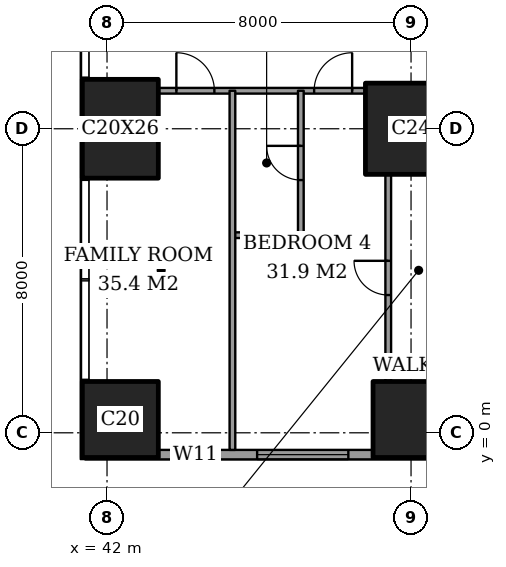
"""IFC4 building model, lengths in metres.
Left out: names, types, materials, properties, quantities, classifications, styles, units other than length and angle.
Written with IfcOpenShell. Run it as: python <this file> out.ifc"""

import sys

from ifc_helpers import new_model, si_unit, direction, frame, frame_2d, origin, origin_2d, place, context, subcontext, project, spatial, rectangle, extrude, element, fill, save


model = new_model("IFC4")
c1 = context("Model", 3, precision=1e-05, world=origin(), true_north=direction((0.0, 1.0)))
c2 = subcontext(c1, "Body", "Model", "MODEL_VIEW")
j1 = project(units=[si_unit("LENGTHUNIT", "METRE"), si_unit("PLANEANGLEUNIT", "RADIAN")], contexts=[c1])
p1 = place(None, origin())
s1 = spatial("IfcSite", under=j1, at=p1, CompositionType="ELEMENT")
p2 = place(p1, origin())
s2 = spatial("IfcBuilding", under=s1, at=p2, CompositionType="ELEMENT")
p3 = place(p2, frame((0.0, 0.0, 128.6)))
s3 = spatial("IfcBuildingStorey", under=s2, at=p3, CompositionType="ELEMENT", Elevation=128.6)
p4 = place(p3, frame((42.35, 0.35, 0.0), z_axis=(0.0, 0.0, 1.0), x_axis=(1.0, 0.0, 0.0)))
e1 = element("IfcColumn", 1, at=p4, inside=s3, PredefinedType="COLUMN", context=c2, shape_type="SweptSolid", body=[
    extrude(rectangle(XDim=2.0, YDim=2.0, at=origin_2d()), origin(), (0.0, 0.0, 1.0), 3.6),
])
p5 = place(p3, frame((42.35, 8.0, 0.0), z_axis=(0.0, 0.0, 1.0), x_axis=(1.0, 0.0, 0.0)))
e2 = element("IfcColumn", 2, at=p5, inside=s3, PredefinedType="COLUMN", context=c2, shape_type="SweptSolid", body=[
    extrude(rectangle(XDim=2.0, YDim=2.6, at=origin_2d()), origin(), (0.0, 0.0, 1.0), 3.6),
])
p6 = place(p3, frame((50.0, 0.35, 0.0), z_axis=(0.0, 0.0, 1.0), x_axis=(1.0, 0.0, 0.0)))
e3 = element("IfcColumn", 3, at=p6, inside=s3, PredefinedType="COLUMN", context=c2, shape_type="SweptSolid", body=[
    extrude(rectangle(XDim=2.0, YDim=2.0, at=origin_2d()), origin(), (0.0, 0.0, 1.0), 3.6),
])
p7 = place(p3, frame((50.0, 8.0, 0.0), z_axis=(0.0, 0.0, 1.0), x_axis=(1.0, 0.0, 0.0)))
e4 = element("IfcColumn", 4, at=p7, inside=s3, PredefinedType="COLUMN", context=c2, shape_type="SweptSolid", body=[
    extrude(rectangle(XDim=2.4, YDim=2.4, at=origin_2d()), origin(), (0.0, 0.0, 1.0), 3.6),
])
p8 = place(p3, frame((41.425, -0.575, 0.0), z_axis=(0.0, 0.0, 1.0), x_axis=(1.0, 0.0, 0.0)))
e5 = element("IfcWall", 5, at=p8, inside=s3, PredefinedType="SOLIDWALL", context=c2, shape_type="SweptSolid", body=[
    extrude(rectangle(XDim=21.4, YDim=0.25, at=frame_2d((10.7, 0.0))), origin(), (0.0, 0.0, 1.0), 3.6),
])
p9 = place(p8, frame((2.3, 0.0, 0.4)))
e6 = element("IfcOpeningElement", 6, at=p9, cuts=e5, PredefinedType="OPENING", context=c2, shape_type="SweptSolid", body=[
    extrude(rectangle(XDim=1.2, YDim=2.2, at=frame_2d((0.6, 1.1))), frame((0.0, 0.135, 0.0), z_axis=(0.0, -1.0, 0.0), x_axis=(1.0, 0.0, 0.0)), (0.0, 0.0, 1.0), 0.27),
])
p10 = place(p8, frame((4.525, 0.0, 0.4)))
e7 = element("IfcOpeningElement", 7, at=p10, cuts=e5, PredefinedType="OPENING", context=c2, shape_type="SweptSolid", body=[
    extrude(rectangle(XDim=2.4, YDim=2.2, at=frame_2d((1.2, 1.1))), frame((0.0, 0.135, 0.0), z_axis=(0.0, -1.0, 0.0), x_axis=(1.0, 0.0, 0.0)), (0.0, 0.0, 1.0), 0.27),
])
p11 = place(p8, frame((9.9, 0.0, 0.4)))
e8 = element("IfcOpeningElement", 8, at=p11, cuts=e5, PredefinedType="OPENING", context=c2, shape_type="SweptSolid", body=[
    extrude(rectangle(XDim=1.2, YDim=2.2, at=frame_2d((0.6, 1.1))), frame((0.0, 0.135, 0.0), z_axis=(0.0, -1.0, 0.0), x_axis=(1.0, 0.0, 0.0)), (0.0, 0.0, 1.0), 0.27),
])
p12 = place(p8, frame((12.225, 0.0, 0.4)))
e9 = element("IfcOpeningElement", 9, at=p12, cuts=e5, PredefinedType="OPENING", context=c2, shape_type="SweptSolid", body=[
    extrude(rectangle(XDim=2.4, YDim=2.2, at=frame_2d((1.2, 1.1))), frame((0.0, 0.135, 0.0), z_axis=(0.0, -1.0, 0.0), x_axis=(1.0, 0.0, 0.0)), (0.0, 0.0, 1.0), 0.27),
])
p13 = place(p8, frame((19.2, 0.0, 0.4)))
e10 = element("IfcOpeningElement", 10, at=p13, cuts=e5, PredefinedType="OPENING", context=c2, shape_type="SweptSolid", body=[
    extrude(rectangle(XDim=1.2, YDim=2.2, at=frame_2d((0.6, 1.1))), frame((0.0, 0.135, 0.0), z_axis=(0.0, -1.0, 0.0), x_axis=(1.0, 0.0, 0.0)), (0.0, 0.0, 1.0), 0.27),
])
p14 = place(p3, frame((45.3, 5.2, 0.0), z_axis=(0.0, 0.0, 1.0), x_axis=(1.0, 0.0, 0.0)))
e11 = element("IfcWall", 11, at=p14, inside=s3, PredefinedType="PARTITIONING", context=c2, shape_type="SweptSolid", body=[
    extrude(rectangle(XDim=1.8, YDim=0.15, at=frame_2d((0.9, 0.0))), origin(), (0.0, 0.0, 1.0), 3.35),
])
p15 = place(p3, frame((43.35, 9.0, 0.0), z_axis=(0.0, 0.0, 1.0), x_axis=(1.0, 0.0, 0.0)))
e12 = element("IfcWall", 12, at=p15, inside=s3, PredefinedType="PARTITIONING", context=c2, shape_type="SweptSolid", body=[
    extrude(rectangle(XDim=5.45, YDim=0.15, at=frame_2d((2.725, 0.0))), origin(), (0.0, 0.0, 1.0), 3.35),
])
p16 = place(p15, frame((4.1, 0.0, 0.0)))
e13 = element("IfcOpeningElement", 13, at=p16, cuts=e12, PredefinedType="OPENING", context=c2, shape_type="SweptSolid", body=[
    extrude(rectangle(XDim=1.0, YDim=2.1, at=frame_2d((0.5, 1.05))), frame((0.0, 0.085, 0.0), z_axis=(0.0, -1.0, 0.0), x_axis=(1.0, 0.0, 0.0)), (0.0, 0.0, 1.0), 0.17),
])
p17 = place(p15, frame((0.475, 0.0, 0.0)))
e14 = element("IfcOpeningElement", 14, at=p17, cuts=e12, PredefinedType="OPENING", context=c2, shape_type="SweptSolid", body=[
    extrude(rectangle(XDim=1.0, YDim=2.1, at=frame_2d((0.5, 1.05))), frame((0.0, 0.085, 0.0), z_axis=(0.0, -1.0, 0.0), x_axis=(1.0, 0.0, 0.0)), (0.0, 0.0, 1.0), 0.17),
])
p18 = place(p3, frame((45.3, -0.45, 0.0), z_axis=(0.0, 0.0, 1.0), x_axis=(0.0, 1.0, 0.0)))
e15 = element("IfcWall", 15, at=p18, inside=s3, PredefinedType="PARTITIONING", context=c2, shape_type="SweptSolid", body=[
    extrude(rectangle(XDim=9.45, YDim=0.15, at=frame_2d((4.725, 0.0))), origin(), (0.0, 0.0, 1.0), 3.35),
])
p19 = place(p3, frame((47.1, 5.2, 0.0), z_axis=(0.0, 0.0, 1.0), x_axis=(0.0, 1.0, 0.0)))
e16 = element("IfcWall", 16, at=p19, inside=s3, PredefinedType="PARTITIONING", context=c2, shape_type="SweptSolid", body=[
    extrude(rectangle(XDim=3.8, YDim=0.15, at=frame_2d((1.9, 0.0))), origin(), (0.0, 0.0, 1.0), 3.35),
])
p20 = place(p19, frame((1.45, 0.0, 0.0)))
e17 = element("IfcOpeningElement", 17, at=p20, cuts=e16, PredefinedType="OPENING", context=c2, shape_type="SweptSolid", body=[
    extrude(rectangle(XDim=0.9, YDim=2.1, at=frame_2d((0.45, 1.05))), frame((0.0, 0.085, 0.0), z_axis=(0.0, -1.0, 0.0), x_axis=(1.0, 0.0, 0.0)), (0.0, 0.0, 1.0), 0.17),
])
p21 = place(p3, frame((49.4, 1.35, 0.0), z_axis=(0.0, 0.0, 1.0), x_axis=(0.0, 1.0, 0.0)))
e18 = element("IfcWall", 18, at=p21, inside=s3, PredefinedType="PARTITIONING", context=c2, shape_type="SweptSolid", body=[
    extrude(rectangle(XDim=5.45, YDim=0.15, at=frame_2d((2.725, 0.0))), origin(), (0.0, 0.0, 1.0), 3.35),
])
p22 = place(p21, frame((2.275, 0.0, 0.0)))
e19 = element("IfcOpeningElement", 19, at=p22, cuts=e18, PredefinedType="OPENING", context=c2, shape_type="SweptSolid", body=[
    extrude(rectangle(XDim=0.9, YDim=2.1, at=frame_2d((0.45, 1.05))), frame((0.0, 0.085, 0.0), z_axis=(0.0, -1.0, 0.0), x_axis=(1.0, 0.0, 0.0)), (0.0, 0.0, 1.0), 0.17),
])
p23 = place(p9, origin())
e20 = element("IfcWindow", 20, at=p23, inside=s3, PartitioningType="SINGLE_PANEL", PredefinedType="WINDOW", context=c2, shape_type="SweptSolid", body=[
    extrude(rectangle(XDim=1.2, YDim=2.2, at=frame_2d((0.6, 1.1))), frame((0.0, 0.03, 0.0), z_axis=(0.0, -1.0, 0.0), x_axis=(1.0, 0.0, 0.0)), (0.0, 0.0, 1.0), 0.06),
])
fill(e6, e20)
p24 = place(p10, origin())
e21 = element("IfcWindow", 21, at=p24, inside=s3, PartitioningType="SINGLE_PANEL", PredefinedType="WINDOW", context=c2, shape_type="SweptSolid", body=[
    extrude(rectangle(XDim=2.4, YDim=2.2, at=frame_2d((1.2, 1.1))), frame((0.0, 0.03, 0.0), z_axis=(0.0, -1.0, 0.0), x_axis=(1.0, 0.0, 0.0)), (0.0, 0.0, 1.0), 0.06),
])
fill(e7, e21)
p25 = place(p22, origin())
e22 = element("IfcDoor", 22, at=p25, inside=s3, OperationType="SINGLE_SWING_LEFT", PredefinedType="DOOR", context=c2, shape_type="SweptSolid", body=[
    extrude(rectangle(XDim=0.9, YDim=2.1, at=frame_2d((0.45, 1.05))), frame((0.0, 0.025, 0.0), z_axis=(0.0, -1.0, 0.0), x_axis=(1.0, 0.0, 0.0)), (0.0, 0.0, 1.0), 0.05),
])
fill(e19, e22)
p26 = place(p20, origin())
e23 = element("IfcDoor", 23, at=p26, inside=s3, OperationType="SINGLE_SWING_LEFT", PredefinedType="DOOR", context=c2, shape_type="SweptSolid", body=[
    extrude(rectangle(XDim=0.9, YDim=2.1, at=frame_2d((0.45, 1.05))), frame((0.0, 0.025, 0.0), z_axis=(0.0, -1.0, 0.0), x_axis=(1.0, 0.0, 0.0)), (0.0, 0.0, 1.0), 0.05),
])
fill(e17, e23)
p27 = place(p16, origin())
e24 = element("IfcDoor", 24, at=p27, inside=s3, OperationType="SINGLE_SWING_LEFT", PredefinedType="DOOR", context=c2, shape_type="SweptSolid", body=[
    extrude(rectangle(XDim=1.0, YDim=2.1, at=frame_2d((0.5, 1.05))), frame((0.0, 0.025, 0.0), z_axis=(0.0, -1.0, 0.0), x_axis=(1.0, 0.0, 0.0)), (0.0, 0.0, 1.0), 0.05),
])
fill(e13, e24)
p28 = place(p17, origin())
e25 = element("IfcDoor", 25, at=p28, inside=s3, OperationType="SINGLE_SWING_RIGHT", PredefinedType="DOOR", context=c2, shape_type="SweptSolid", body=[
    extrude(rectangle(XDim=1.0, YDim=2.1, at=frame_2d((0.5, 1.05))), frame((0.0, 0.025, 0.0), z_axis=(0.0, -1.0, 0.0), x_axis=(1.0, 0.0, 0.0)), (0.0, 0.0, 1.0), 0.05),
])
fill(e14, e25)
save(model, sys.argv[1])
